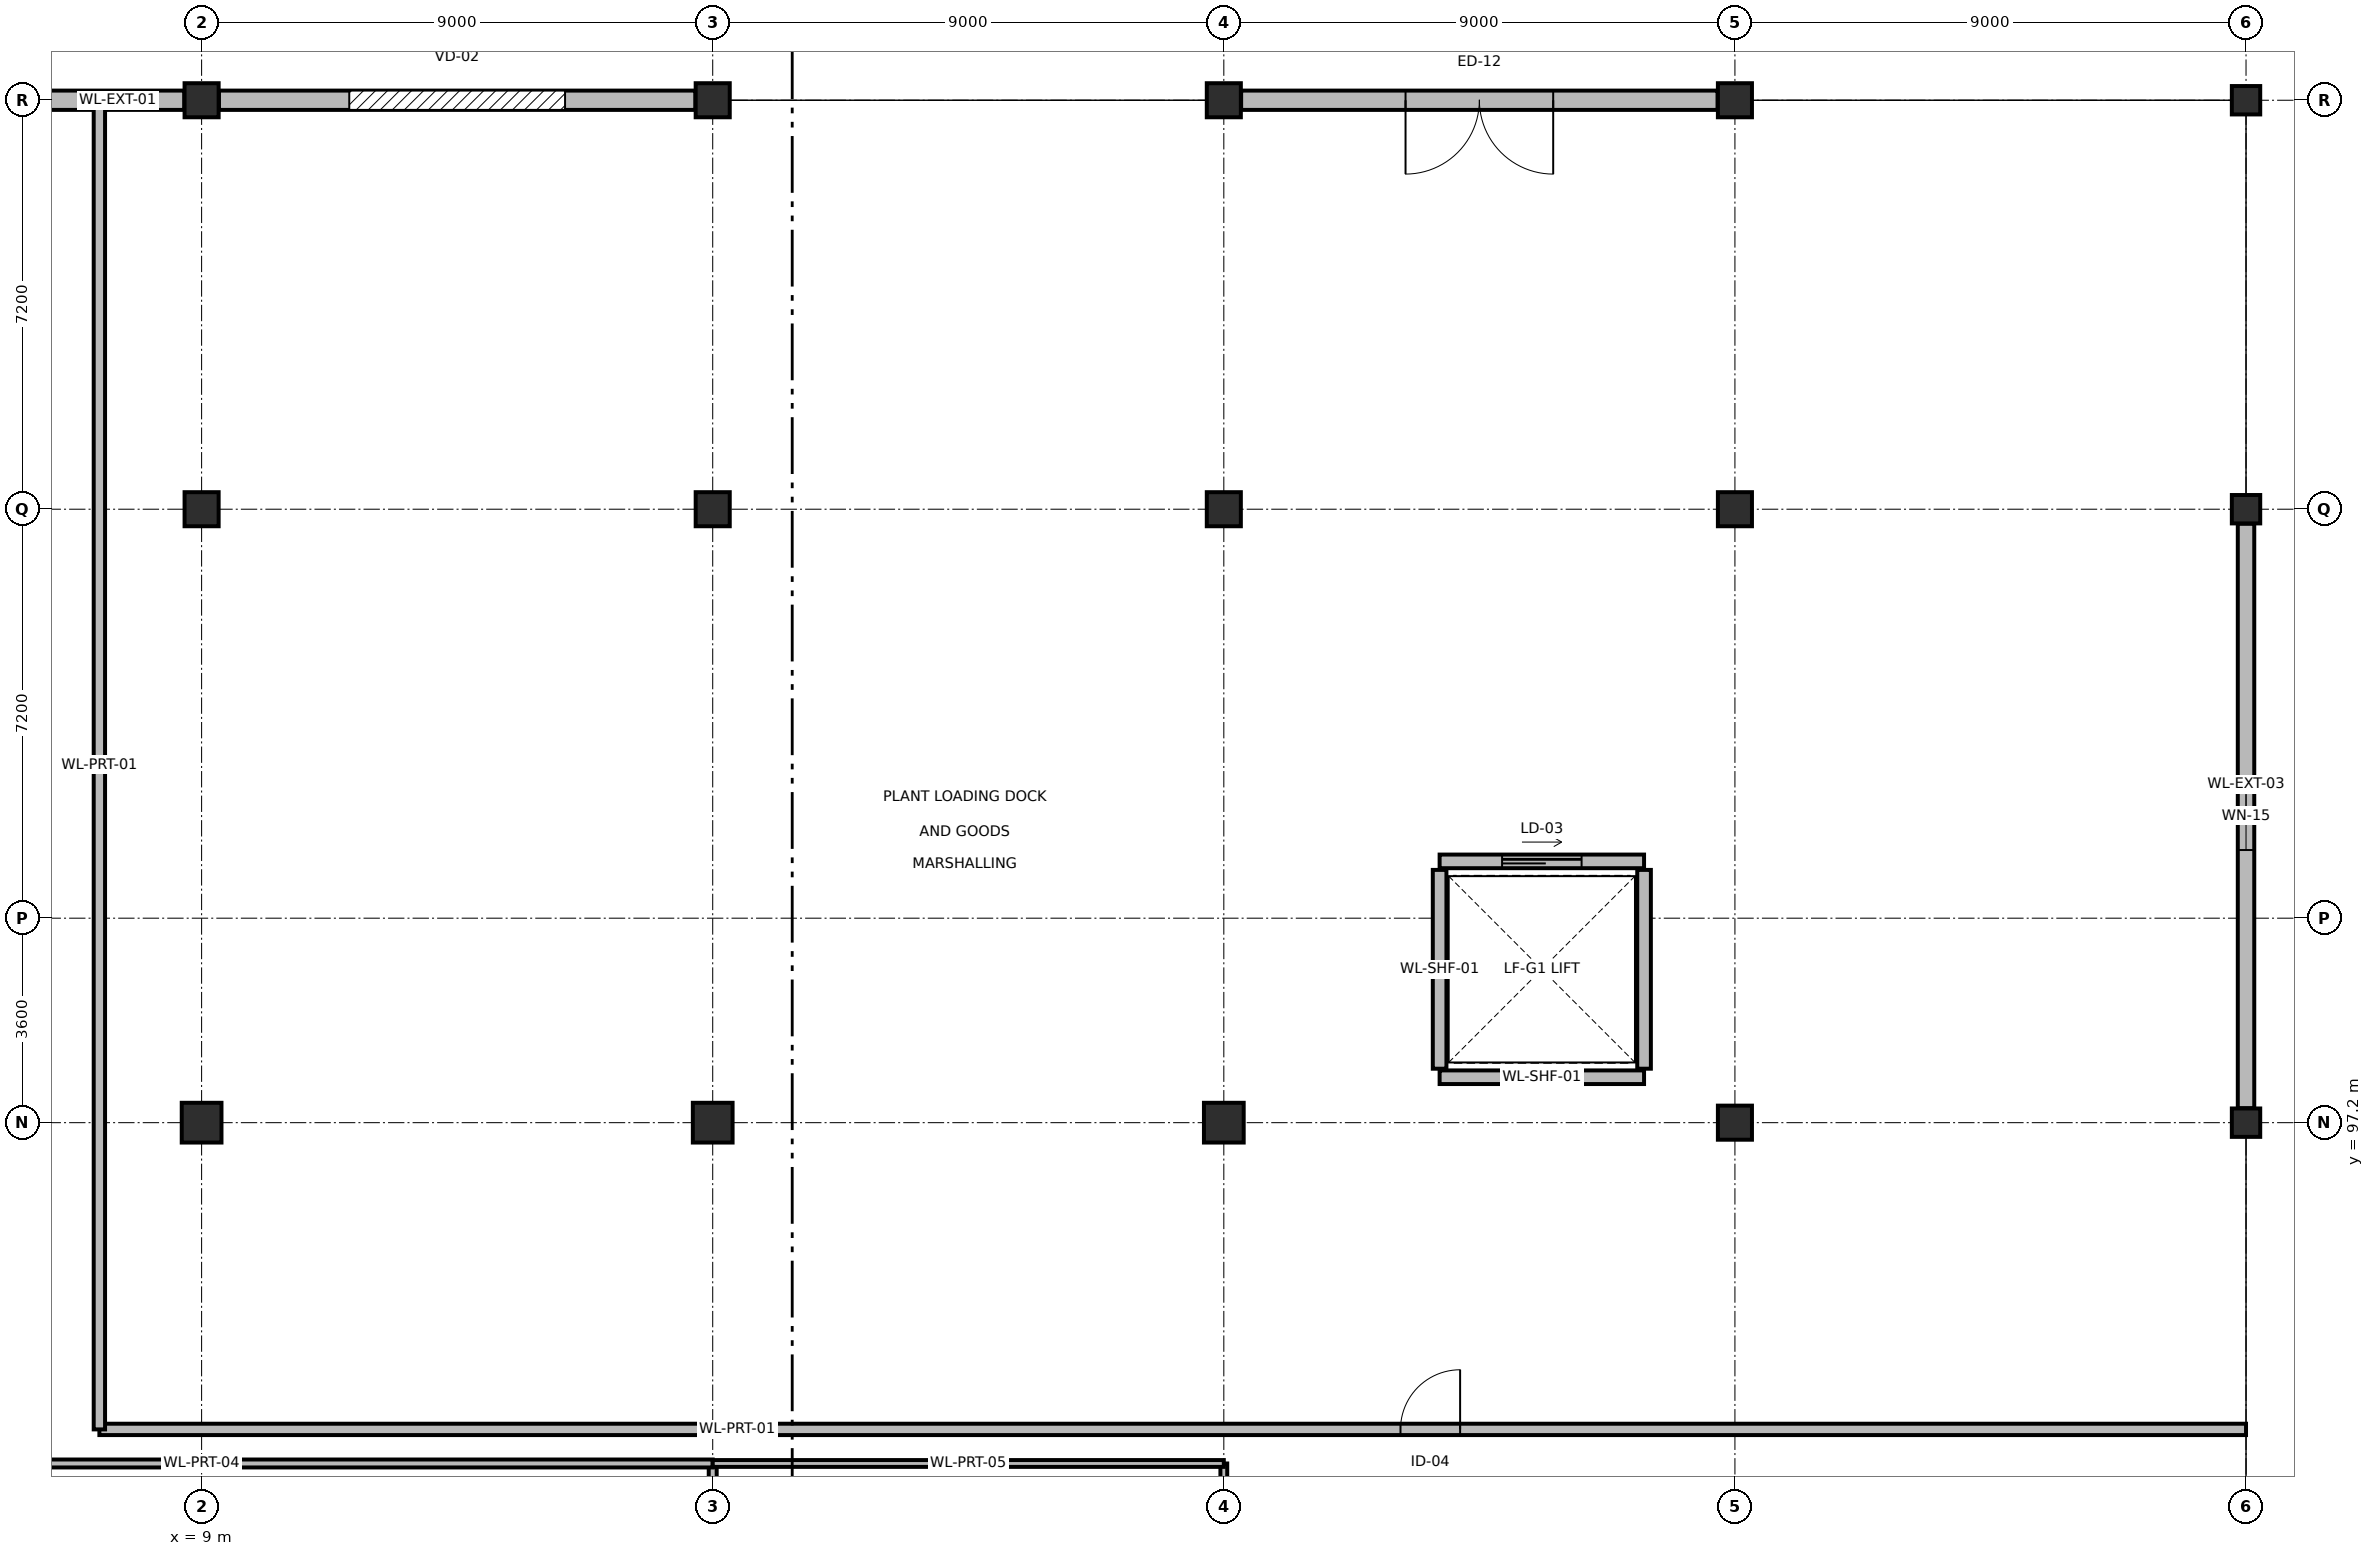
"""IFC4 building model, lengths in metres.
Left out: names, types, materials, properties, quantities, classifications, styles, units other than length and angle.
Written with IfcOpenShell. Run it as: python <this file> out.ifc"""

import sys

from ifc_helpers import new_model, si_unit, direction, frame, frame_2d, origin, origin_2d, place, context, subcontext, project, spatial, rectangle, extrude, element, fill, save


model = new_model("IFC4")
c1 = context("Model", 3, precision=1e-05, world=origin(), true_north=direction((0.0, 1.0)))
c2 = subcontext(c1, "Body", "Model", "MODEL_VIEW")
j1 = project(units=[si_unit("LENGTHUNIT", "METRE"), si_unit("PLANEANGLEUNIT", "RADIAN")], contexts=[c1])
p1 = place(None, origin())
s1 = spatial("IfcSite", under=j1, at=p1, CompositionType="ELEMENT")
p2 = place(p1, origin())
s2 = spatial("IfcBuilding", under=s1, at=p2, CompositionType="ELEMENT")
p3 = place(p2, origin())
s3 = spatial("IfcBuildingStorey", under=s2, at=p3, CompositionType="ELEMENT", Elevation=0.0)
for number, where, z_axis, x_axis in (
    (1, (9.0, 97.2, 0.0), (0.0, 0.0, 1.0), (1.0, 0.0, 0.0)),
    (2, (18.0, 97.2, 0.0), (0.0, 0.0, 1.0), (1.0, 0.0, 0.0)),
    (3, (27.0, 97.2, 0.0), (0.0, 0.0, 1.0), (1.0, 0.0, 0.0)),
):
    element("IfcColumn", number, at=place(p3, frame(where, z_axis=z_axis, x_axis=x_axis)), inside=s3, PredefinedType="COLUMN", context=c2, shape_type="SweptSolid", body=[
        extrude(rectangle(XDim=0.7, YDim=0.7, at=origin_2d()), origin(), (0.0, 0.0, 1.0), 4.8),
    ])
for number, where, z_axis, x_axis in (
    (4, (9.0, 108.0, 0.0), (0.0, 0.0, 1.0), (1.0, 0.0, 0.0)),
    (5, (9.0, 115.2, 0.0), (0.0, 0.0, 1.0), (1.0, 0.0, 0.0)),
    (6, (18.0, 108.0, 0.0), (0.0, 0.0, 1.0), (1.0, 0.0, 0.0)),
    (7, (18.0, 115.2, 0.0), (0.0, 0.0, 1.0), (1.0, 0.0, 0.0)),
    (8, (27.0, 108.0, 0.0), (0.0, 0.0, 1.0), (1.0, 0.0, 0.0)),
    (9, (27.0, 115.2, 0.0), (0.0, 0.0, 1.0), (1.0, 0.0, 0.0)),
    (10, (36.0, 97.2, 0.0), (0.0, 0.0, 1.0), (1.0, 0.0, 0.0)),
    (11, (36.0, 108.0, 0.0), (0.0, 0.0, 1.0), (1.0, 0.0, 0.0)),
    (12, (36.0, 115.2, 0.0), (0.0, 0.0, 1.0), (1.0, 0.0, 0.0)),
):
    element("IfcColumn", number, at=place(p3, frame(where, z_axis=z_axis, x_axis=x_axis)), inside=s3, PredefinedType="COLUMN", context=c2, shape_type="SweptSolid", body=[
        extrude(rectangle(XDim=0.6, YDim=0.6, at=origin_2d()), origin(), (0.0, 0.0, 1.0), 4.8),
    ])
for number, where, z_axis, x_axis in (
    (13, (45.0, 97.2, 0.0), (0.0, 0.0, 1.0), (1.0, 0.0, 0.0)),
    (14, (45.0, 108.0, 0.0), (0.0, 0.0, 1.0), (1.0, 0.0, 0.0)),
    (15, (45.0, 115.2, 0.0), (0.0, 0.0, 1.0), (1.0, 0.0, 0.0)),
):
    element("IfcColumn", number, at=place(p3, frame(where, z_axis=z_axis, x_axis=x_axis)), inside=s3, PredefinedType="COLUMN", context=c2, shape_type="SweptSolid", body=[
        extrude(rectangle(XDim=0.5, YDim=0.5, at=origin_2d()), origin(), (0.0, 0.0, 1.0), 4.8),
    ])
p4 = place(p3, frame((0.305, 115.2, 0.0), z_axis=(0.0, 0.0, 1.0), x_axis=(1.0, 0.0, 0.0)))
e16 = element("IfcWall", 16, at=p4, inside=s3, PredefinedType="SOLIDWALL", context=c2, shape_type="SweptSolid", body=[
    extrude(rectangle(XDim=8.39, YDim=0.34, at=frame_2d((4.195, 0.0))), origin(), (0.0, 0.0, 1.0), 3.785),
])
p5 = place(p4, frame((0.995, 0.0, 0.0)))
e17 = element("IfcOpeningElement", 17, at=p5, cuts=e16, PredefinedType="OPENING", context=c2, shape_type="SweptSolid", body=[
    extrude(rectangle(XDim=4.6, YDim=3.4, at=frame_2d((2.3, 1.7))), frame((0.0, 0.18, 0.0), z_axis=(0.0, -1.0, 0.0), x_axis=(1.0, 0.0, 0.0)), (0.0, 0.0, 1.0), 0.36),
])
p6 = place(p3, frame((9.305, 115.2, 0.0), z_axis=(0.0, 0.0, 1.0), x_axis=(1.0, 0.0, 0.0)))
e18 = element("IfcWall", 18, at=p6, inside=s3, PredefinedType="SOLIDWALL", context=c2, shape_type="SweptSolid", body=[
    extrude(rectangle(XDim=8.39, YDim=0.34, at=frame_2d((4.195, 0.0))), origin(), (0.0, 0.0, 1.0), 3.785),
])
p7 = place(p6, frame((2.295, 0.0, 0.0)))
e19 = element("IfcOpeningElement", 19, at=p7, cuts=e18, PredefinedType="OPENING", context=c2, shape_type="SweptSolid", body=[
    extrude(rectangle(XDim=3.8, YDim=3.2, at=frame_2d((1.9, 1.6))), frame((0.0, 0.18, 0.0), z_axis=(0.0, -1.0, 0.0), x_axis=(1.0, 0.0, 0.0)), (0.0, 0.0, 1.0), 0.36),
])
p8 = place(p3, frame((27.305, 115.2, 0.0), z_axis=(0.0, 0.0, 1.0), x_axis=(1.0, 0.0, 0.0)))
e20 = element("IfcWall", 20, at=p8, inside=s3, PredefinedType="SOLIDWALL", context=c2, shape_type="SweptSolid", body=[
    extrude(rectangle(XDim=8.39, YDim=0.34, at=frame_2d((4.195, 0.0))), origin(), (0.0, 0.0, 1.0), 3.785),
])
p9 = place(p8, frame((2.895, 0.0, 0.0)))
e21 = element("IfcOpeningElement", 21, at=p9, cuts=e20, PredefinedType="OPENING", context=c2, shape_type="SweptSolid", body=[
    extrude(rectangle(XDim=2.6, YDim=2.7, at=frame_2d((1.3, 1.35))), frame((0.0, 0.18, 0.0), z_axis=(0.0, -1.0, 0.0), x_axis=(1.0, 0.0, 0.0)), (0.0, 0.0, 1.0), 0.36),
])
p10 = place(p3, frame((45.0, 107.745, 0.0), z_axis=(0.0, 0.0, 1.0), x_axis=(0.0, -1.0, 0.0)))
e22 = element("IfcWall", 22, at=p10, inside=s3, PredefinedType="SOLIDWALL", context=c2, shape_type="SweptSolid", body=[
    extrude(rectangle(XDim=10.29, YDim=0.29, at=frame_2d((5.145, 0.0))), origin(), (0.0, 0.0, 1.0), 3.785),
])
p11 = place(p10, frame((4.545, 0.0, 0.95)))
e23 = element("IfcOpeningElement", 23, at=p11, cuts=e22, PredefinedType="OPENING", context=c2, shape_type="SweptSolid", body=[
    extrude(rectangle(XDim=1.2, YDim=1.5, at=frame_2d((0.6, 0.75))), frame((0.0, 0.155, 0.0), z_axis=(0.0, -1.0, 0.0), x_axis=(1.0, 0.0, 0.0)), (0.0, 0.0, 1.0), 0.31),
])
p12 = place(p3, frame((30.8, 101.8, 0.0), z_axis=(0.0, 0.0, 1.0), x_axis=(1.0, 0.0, 0.0)))
e24 = element("IfcWall", 24, at=p12, inside=s3, PredefinedType="SOLIDWALL", context=c2, shape_type="SweptSolid", body=[
    extrude(rectangle(XDim=3.6, YDim=0.24, at=frame_2d((1.8, 0.0))), origin(), (0.0, 0.0, 1.0), 4.485),
])
p13 = place(p12, frame((1.1, 0.0, 0.0)))
e25 = element("IfcOpeningElement", 25, at=p13, cuts=e24, PredefinedType="OPENING", context=c2, shape_type="SweptSolid", body=[
    extrude(rectangle(XDim=1.4, YDim=2.3, at=frame_2d((0.7, 1.15))), frame((0.0, 0.13, 0.0), z_axis=(0.0, -1.0, 0.0), x_axis=(1.0, 0.0, 0.0)), (0.0, 0.0, 1.0), 0.26),
])
p14 = place(p3, frame((30.8, 98.0, 0.0), z_axis=(0.0, 0.0, 1.0), x_axis=(1.0, 0.0, 0.0)))
e26 = element("IfcWall", 26, at=p14, inside=s3, PredefinedType="SOLIDWALL", context=c2, shape_type="SweptSolid", body=[
    extrude(rectangle(XDim=3.6, YDim=0.24, at=frame_2d((1.8, 0.0))), origin(), (0.0, 0.0, 1.0), 4.485),
])
for number, where, z_axis, x_axis in (
    (27, (30.8, 98.15, 0.0), (0.0, 0.0, 1.0), (0.0, 1.0, 0.0)),
    (28, (34.4, 98.15, 0.0), (0.0, 0.0, 1.0), (0.0, 1.0, 0.0)),
):
    element("IfcWall", number, at=place(p3, frame(where, z_axis=z_axis, x_axis=x_axis)), inside=s3, PredefinedType="SOLIDWALL", context=c2, shape_type="SweptSolid", body=[
        extrude(rectangle(XDim=3.5, YDim=0.24, at=frame_2d((1.75, 0.0))), origin(), (0.0, 0.0, 1.0), 4.485),
    ])
p15 = place(p3, frame((18.0, 68.4, 0.0), z_axis=(0.0, 0.0, 1.0), x_axis=(0.0, 1.0, 0.0)))
e29 = element("IfcWall", 29, at=p15, inside=s3, PredefinedType="PARTITIONING", context=c2, shape_type="SweptSolid", body=[
    extrude(rectangle(XDim=22.8, YDim=0.14, at=frame_2d((11.4, 0.0))), origin(), (0.0, 0.0, 1.0), 3.735),
])
p16 = place(p15, frame((4.541, 0.0, 0.0)))
e30 = element("IfcOpeningElement", 30, at=p16, cuts=e29, PredefinedType="OPENING", context=c2, shape_type="SweptSolid", body=[
    extrude(rectangle(XDim=0.95, YDim=2.1, at=frame_2d((0.475, 1.05))), frame((0.0, 0.08, 0.0), z_axis=(0.0, -1.0, 0.0), x_axis=(1.0, 0.0, 0.0)), (0.0, 0.0, 1.0), 0.16),
])
p17 = place(p3, frame((0.0, 91.2, 0.0), z_axis=(0.0, 0.0, 1.0), x_axis=(1.0, 0.0, 0.0)))
e31 = element("IfcWall", 31, at=p17, inside=s3, PredefinedType="PARTITIONING", context=c2, shape_type="SweptSolid", body=[
    extrude(rectangle(XDim=18.0, YDim=0.14, at=frame_2d((9.0, 0.0))), origin(), (0.0, 0.0, 1.0), 3.735),
])
p18 = place(p3, frame((27.0, 68.4, 0.0), z_axis=(0.0, 0.0, 1.0), x_axis=(0.0, 1.0, 0.0)))
e32 = element("IfcWall", 32, at=p18, inside=s3, PredefinedType="PARTITIONING", context=c2, shape_type="SweptSolid", body=[
    extrude(rectangle(XDim=22.8, YDim=0.12, at=frame_2d((11.4, 0.0))), origin(), (0.0, 0.0, 1.0), 3.735),
])
p19 = place(p18, frame((4.566, 0.0, 0.0)))
e33 = element("IfcOpeningElement", 33, at=p19, cuts=e32, PredefinedType="OPENING", context=c2, shape_type="SweptSolid", body=[
    extrude(rectangle(XDim=0.9, YDim=2.1, at=frame_2d((0.45, 1.05))), frame((0.0, 0.07, 0.0), z_axis=(0.0, -1.0, 0.0), x_axis=(1.0, 0.0, 0.0)), (0.0, 0.0, 1.0), 0.14),
])
p20 = place(p3, frame((18.0, 91.2, 0.0), z_axis=(0.0, 0.0, 1.0), x_axis=(1.0, 0.0, 0.0)))
e34 = element("IfcWall", 34, at=p20, inside=s3, PredefinedType="PARTITIONING", context=c2, shape_type="SweptSolid", body=[
    extrude(rectangle(XDim=9.0, YDim=0.12, at=frame_2d((4.5, 0.0))), origin(), (0.0, 0.0, 1.0), 3.735),
])
p21 = place(p3, frame((7.2, 91.8, 0.0), z_axis=(0.0, 0.0, 1.0), x_axis=(1.0, 0.0, 0.0)))
e35 = element("IfcWall", 35, at=p21, inside=s3, PredefinedType="PARTITIONING", context=c2, shape_type="SweptSolid", body=[
    extrude(rectangle(XDim=37.8, YDim=0.2, at=frame_2d((18.9, 0.0))), origin(), (0.0, 0.0, 1.0), 3.735),
])
p22 = place(p21, frame((22.911, 0.0, 0.0)))
e36 = element("IfcOpeningElement", 36, at=p22, cuts=e35, PredefinedType="OPENING", context=c2, shape_type="SweptSolid", body=[
    extrude(rectangle(XDim=1.05, YDim=2.15, at=frame_2d((0.525, 1.075))), frame((0.0, 0.11, 0.0), z_axis=(0.0, -1.0, 0.0), x_axis=(1.0, 0.0, 0.0)), (0.0, 0.0, 1.0), 0.22),
])
p23 = place(p3, frame((7.2, 91.8, 0.0), z_axis=(0.0, 0.0, 1.0), x_axis=(0.0, 1.0, 0.0)))
e37 = element("IfcWall", 37, at=p23, inside=s3, PredefinedType="PARTITIONING", context=c2, shape_type="SweptSolid", body=[
    extrude(rectangle(XDim=23.4, YDim=0.2, at=frame_2d((11.7, 0.0))), origin(), (0.0, 0.0, 1.0), 3.785),
])
p24 = place(p7, origin())
e38 = element("IfcDoor", 38, at=p24, inside=s3, OperationType="ROLLINGUP", PredefinedType="GATE", context=c2, shape_type="SweptSolid", body=[
    extrude(rectangle(XDim=3.8, YDim=3.2, at=frame_2d((1.9, 1.6))), frame((0.0, 0.025, 0.0), z_axis=(0.0, -1.0, 0.0), x_axis=(1.0, 0.0, 0.0)), (0.0, 0.0, 1.0), 0.05),
])
fill(e19, e38)
p25 = place(p9, origin())
e39 = element("IfcDoor", 39, at=p25, inside=s3, OperationType="DOUBLE_DOOR_SINGLE_SWING", PredefinedType="DOOR", context=c2, shape_type="SweptSolid", body=[
    extrude(rectangle(XDim=2.6, YDim=2.7, at=frame_2d((1.3, 1.35))), frame((0.0, 0.025, 0.0), z_axis=(0.0, -1.0, 0.0), x_axis=(1.0, 0.0, 0.0)), (0.0, 0.0, 1.0), 0.05),
])
fill(e21, e39)
p26 = place(p11, origin())
e40 = element("IfcWindow", 40, at=p26, inside=s3, PartitioningType="SINGLE_PANEL", PredefinedType="WINDOW", context=c2, shape_type="SweptSolid", body=[
    extrude(rectangle(XDim=1.2, YDim=1.5, at=frame_2d((0.6, 0.75))), frame((0.0, 0.03, 0.0), z_axis=(0.0, -1.0, 0.0), x_axis=(1.0, 0.0, 0.0)), (0.0, 0.0, 1.0), 0.06),
])
fill(e23, e40)
p27 = place(p13, origin())
e41 = element("IfcDoor", 41, at=p27, inside=s3, OperationType="DOUBLE_DOOR_SLIDING", PredefinedType="DOOR", context=c2, shape_type="SweptSolid", body=[
    extrude(rectangle(XDim=1.4, YDim=2.3, at=frame_2d((0.7, 1.15))), frame((0.0, 0.025, 0.0), z_axis=(0.0, -1.0, 0.0), x_axis=(1.0, 0.0, 0.0)), (0.0, 0.0, 1.0), 0.05),
])
fill(e25, e41)
p28 = place(p22, origin())
e42 = element("IfcDoor", 42, at=p28, inside=s3, OperationType="SINGLE_SWING_RIGHT", PredefinedType="DOOR", context=c2, shape_type="SweptSolid", body=[
    extrude(rectangle(XDim=1.05, YDim=2.15, at=frame_2d((0.525, 1.075))), frame((0.0, 0.025, 0.0), z_axis=(0.0, -1.0, 0.0), x_axis=(1.0, 0.0, 0.0)), (0.0, 0.0, 1.0), 0.05),
])
fill(e36, e42)
save(model, sys.argv[1])
